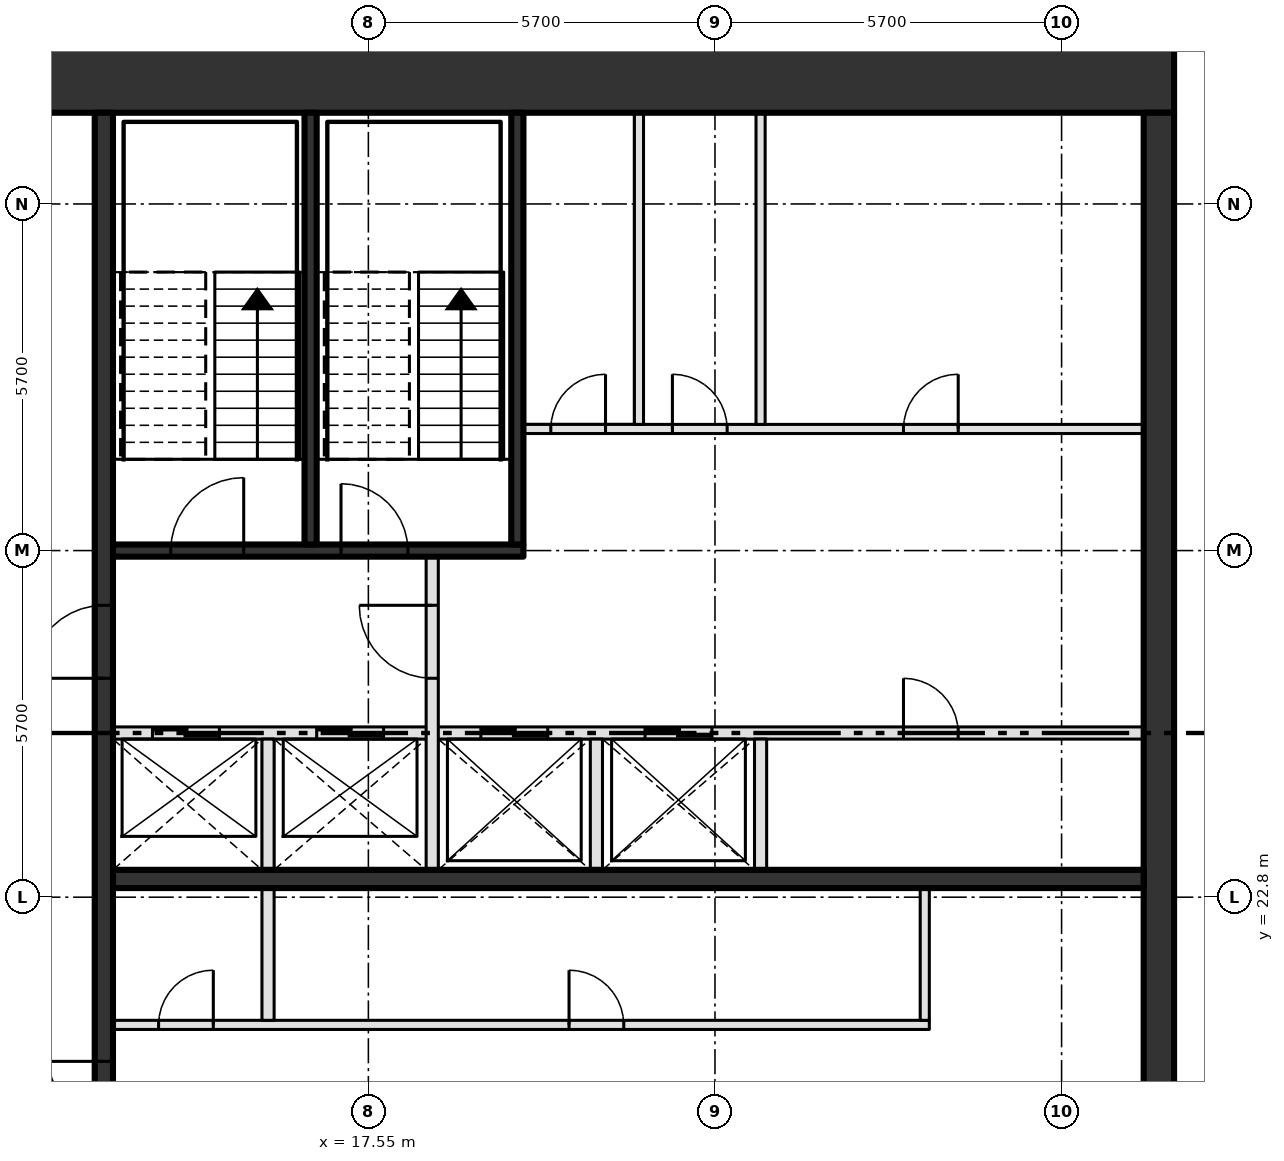
"""IFC4 building model, lengths in metres.
Left out: names, types, materials, properties, quantities, classifications, styles, units other than length and angle.
Written with IfcOpenShell. Run it as: python <this file> out.ifc"""

import sys

from ifc_helpers import new_model, si_unit, direction, frame, frame_2d, origin, place, context, subcontext, project, spatial, rectangle, extrude, element, fill, save


model = new_model("IFC4")
c1 = context("Model", 3, precision=1e-05, world=origin(), true_north=direction((0.0, 1.0)))
c2 = subcontext(c1, "Body", "Model", "MODEL_VIEW")
j1 = project(units=[si_unit("LENGTHUNIT", "METRE"), si_unit("PLANEANGLEUNIT", "RADIAN")], contexts=[c1])
p1 = place(None, origin())
s1 = spatial("IfcSite", under=j1, at=p1, CompositionType="ELEMENT")
p2 = place(p1, origin())
s2 = spatial("IfcBuilding", under=s1, at=p2, CompositionType="ELEMENT")
p3 = place(p2, frame((0.0, 0.0, 358.2)))
s3 = spatial("IfcBuildingStorey", under=s2, at=p3, CompositionType="ELEMENT", Elevation=358.2)
p4 = place(p3, frame((8.0, 36.3, -0.3), z_axis=(0.0, 0.0, 1.0), x_axis=(1.0, 0.0, 0.0)))
e1 = element("IfcWall", 1, at=p4, inside=s3, PredefinedType="SHEAR", context=c2, shape_type="SweptSolid", body=[
    extrude(rectangle(XDim=22.8, YDim=1.2, at=frame_2d((11.4, 0.0))), origin(), (0.0, 0.0, 1.0), 4.2),
])
p5 = place(p4, frame((2.3, 0.0, 0.3)))
e2 = element("IfcOpeningElement", 2, at=p5, cuts=e1, PredefinedType="OPENING", context=c2, shape_type="SweptSolid", body=[
    extrude(rectangle(XDim=1.8, YDim=2.1, at=frame_2d((0.9, 1.05))), frame((0.0, 0.61, 0.0), z_axis=(0.0, -1.0, 0.0), x_axis=(1.0, 0.0, 0.0)), (0.0, 0.0, 1.0), 1.22),
])
p6 = place(p3, frame((30.55, 14.6, -0.3), z_axis=(0.0, 0.0, 1.0), x_axis=(0.0, 1.0, 0.0)))
e3 = element("IfcWall", 3, at=p6, inside=s3, PredefinedType="SHEAR", context=c2, shape_type="SweptSolid", body=[
    extrude(rectangle(XDim=21.1, YDim=0.5, at=frame_2d((10.55, 0.0))), origin(), (0.0, 0.0, 1.0), 4.2),
])
p7 = place(p3, frame((13.35, 20.7, 0.0), z_axis=(0.0, 0.0, 1.0), x_axis=(1.0, 0.0, 0.0)))
e4 = element("IfcWall", 4, at=p7, inside=s3, PredefinedType="PARTITIONING", context=c2, shape_type="SweptSolid", body=[
    extrude(rectangle(XDim=13.425, YDim=0.15, at=frame_2d((6.712, 0.0))), origin(), (0.0, 0.0, 1.0), 3.9),
])
p8 = place(p7, frame((0.75, 0.0, 0.0)))
e5 = element("IfcOpeningElement", 5, at=p8, cuts=e4, PredefinedType="OPENING", context=c2, shape_type="SweptSolid", body=[
    extrude(rectangle(XDim=0.9, YDim=2.1, at=frame_2d((0.45, 1.05))), frame((0.0, 0.085, 0.0), z_axis=(0.0, -1.0, 0.0), x_axis=(1.0, 0.0, 0.0)), (0.0, 0.0, 1.0), 0.17),
])
p9 = place(p7, frame((7.5, 0.0, 0.0)))
e6 = element("IfcOpeningElement", 6, at=p9, cuts=e4, PredefinedType="OPENING", context=c2, shape_type="SweptSolid", body=[
    extrude(rectangle(XDim=0.9, YDim=2.1, at=frame_2d((0.45, 1.05))), frame((0.0, 0.085, 0.0), z_axis=(0.0, -1.0, 0.0), x_axis=(1.0, 0.0, 0.0)), (0.0, 0.0, 1.0), 0.17),
])
p10 = place(p3, frame((13.35, 23.1, 0.0), z_axis=(0.0, 0.0, 1.0), x_axis=(1.0, 0.0, 0.0)))
e7 = element("IfcWall", 7, at=p10, inside=s3, PredefinedType="SHEAR", context=c2, shape_type="SweptSolid", body=[
    extrude(rectangle(XDim=16.95, YDim=0.3, at=frame_2d((8.475, 0.0))), origin(), (0.0, 0.0, 1.0), 3.9),
])
p11 = place(p3, frame((13.35, 25.5, 0.0), z_axis=(0.0, 0.0, 1.0), x_axis=(1.0, 0.0, 0.0)))
e8 = element("IfcWall", 8, at=p11, inside=s3, PredefinedType="SOLIDWALL", context=c2, shape_type="SweptSolid", body=[
    extrude(rectangle(XDim=16.95, YDim=0.2, at=frame_2d((8.475, 0.0))), origin(), (0.0, 0.0, 1.0), 3.9),
])
p12 = place(p11, frame((0.65, 0.0, 0.0)))
e9 = element("IfcOpeningElement", 9, at=p12, cuts=e8, PredefinedType="OPENING", context=c2, shape_type="SweptSolid", body=[
    extrude(rectangle(XDim=1.1, YDim=2.1, at=frame_2d((0.55, 1.05))), frame((0.0, 0.11, 0.0), z_axis=(0.0, -1.0, 0.0), x_axis=(1.0, 0.0, 0.0)), (0.0, 0.0, 1.0), 0.22),
])
p13 = place(p11, frame((3.35, 0.0, 0.0)))
e10 = element("IfcOpeningElement", 10, at=p13, cuts=e8, PredefinedType="OPENING", context=c2, shape_type="SweptSolid", body=[
    extrude(rectangle(XDim=1.1, YDim=2.1, at=frame_2d((0.55, 1.05))), frame((0.0, 0.11, 0.0), z_axis=(0.0, -1.0, 0.0), x_axis=(1.0, 0.0, 0.0)), (0.0, 0.0, 1.0), 0.22),
])
p14 = place(p11, frame((6.05, 0.0, 0.0)))
e11 = element("IfcOpeningElement", 11, at=p14, cuts=e8, PredefinedType="OPENING", context=c2, shape_type="SweptSolid", body=[
    extrude(rectangle(XDim=1.1, YDim=2.1, at=frame_2d((0.55, 1.05))), frame((0.0, 0.11, 0.0), z_axis=(0.0, -1.0, 0.0), x_axis=(1.0, 0.0, 0.0)), (0.0, 0.0, 1.0), 0.22),
])
p15 = place(p11, frame((8.75, 0.0, 0.0)))
e12 = element("IfcOpeningElement", 12, at=p15, cuts=e8, PredefinedType="OPENING", context=c2, shape_type="SweptSolid", body=[
    extrude(rectangle(XDim=1.1, YDim=2.1, at=frame_2d((0.55, 1.05))), frame((0.0, 0.11, 0.0), z_axis=(0.0, -1.0, 0.0), x_axis=(1.0, 0.0, 0.0)), (0.0, 0.0, 1.0), 0.22),
])
p16 = place(p11, frame((13.0, 0.0, 0.0)))
e13 = element("IfcOpeningElement", 13, at=p16, cuts=e8, PredefinedType="OPENING", context=c2, shape_type="SweptSolid", body=[
    extrude(rectangle(XDim=0.9, YDim=2.1, at=frame_2d((0.45, 1.05))), frame((0.0, 0.11, 0.0), z_axis=(0.0, -1.0, 0.0), x_axis=(1.0, 0.0, 0.0)), (0.0, 0.0, 1.0), 0.22),
])
p17 = place(p3, frame((13.35, 28.5, 0.0), z_axis=(0.0, 0.0, 1.0), x_axis=(1.0, 0.0, 0.0)))
e14 = element("IfcWall", 14, at=p17, inside=s3, PredefinedType="SOLIDWALL", context=c2, shape_type="SweptSolid", body=[
    extrude(rectangle(XDim=6.75, YDim=0.2, at=frame_2d((3.375, 0.0))), origin(), (0.0, 0.0, 1.0), 3.9),
])
p18 = place(p17, frame((0.95, 0.0, 0.0)))
e15 = element("IfcOpeningElement", 15, at=p18, cuts=e14, PredefinedType="OPENING", context=c2, shape_type="SweptSolid", body=[
    extrude(rectangle(XDim=1.2, YDim=2.1, at=frame_2d((0.6, 1.05))), frame((0.0, 0.11, 0.0), z_axis=(0.0, -1.0, 0.0), x_axis=(1.0, 0.0, 0.0)), (0.0, 0.0, 1.0), 0.22),
])
p19 = place(p17, frame((3.75, 0.0, 0.0)))
e16 = element("IfcOpeningElement", 16, at=p19, cuts=e14, PredefinedType="OPENING", context=c2, shape_type="SweptSolid", body=[
    extrude(rectangle(XDim=1.1, YDim=2.1, at=frame_2d((0.55, 1.05))), frame((0.0, 0.11, 0.0), z_axis=(0.0, -1.0, 0.0), x_axis=(1.0, 0.0, 0.0)), (0.0, 0.0, 1.0), 0.22),
])
p20 = place(p3, frame((20.1, 30.5, 0.0), z_axis=(0.0, 0.0, 1.0), x_axis=(1.0, 0.0, 0.0)))
e17 = element("IfcWall", 17, at=p20, inside=s3, PredefinedType="PARTITIONING", context=c2, shape_type="SweptSolid", body=[
    extrude(rectangle(XDim=10.2, YDim=0.15, at=frame_2d((5.1, 0.0))), origin(), (0.0, 0.0, 1.0), 3.9),
])
p21 = place(p20, frame((0.45, 0.0, 0.0)))
e18 = element("IfcOpeningElement", 18, at=p21, cuts=e17, PredefinedType="OPENING", context=c2, shape_type="SweptSolid", body=[
    extrude(rectangle(XDim=0.9, YDim=2.1, at=frame_2d((0.45, 1.05))), frame((0.0, 0.085, 0.0), z_axis=(0.0, -1.0, 0.0), x_axis=(1.0, 0.0, 0.0)), (0.0, 0.0, 1.0), 0.17),
])
p22 = place(p20, frame((2.45, 0.0, 0.0)))
e19 = element("IfcOpeningElement", 19, at=p22, cuts=e17, PredefinedType="OPENING", context=c2, shape_type="SweptSolid", body=[
    extrude(rectangle(XDim=0.9, YDim=2.1, at=frame_2d((0.45, 1.05))), frame((0.0, 0.085, 0.0), z_axis=(0.0, -1.0, 0.0), x_axis=(1.0, 0.0, 0.0)), (0.0, 0.0, 1.0), 0.17),
])
p23 = place(p20, frame((6.25, 0.0, 0.0)))
e20 = element("IfcOpeningElement", 20, at=p23, cuts=e17, PredefinedType="OPENING", context=c2, shape_type="SweptSolid", body=[
    extrude(rectangle(XDim=0.9, YDim=2.1, at=frame_2d((0.45, 1.05))), frame((0.0, 0.085, 0.0), z_axis=(0.0, -1.0, 0.0), x_axis=(1.0, 0.0, 0.0)), (0.0, 0.0, 1.0), 0.17),
])
p24 = place(p3, frame((13.2, 14.6, 0.0), z_axis=(0.0, 0.0, 1.0), x_axis=(0.0, 1.0, 0.0)))
e21 = element("IfcWall", 21, at=p24, inside=s3, PredefinedType="SHEAR", context=c2, shape_type="SweptSolid", body=[
    extrude(rectangle(XDim=21.1, YDim=0.3, at=frame_2d((10.55, 0.0))), origin(), (0.0, 0.0, 1.0), 3.9),
])
p25 = place(p24, frame((3.7, 0.0, 0.0)))
e22 = element("IfcOpeningElement", 22, at=p25, cuts=e21, PredefinedType="OPENING", context=c2, shape_type="SweptSolid", body=[
    extrude(rectangle(XDim=1.8, YDim=2.1, at=frame_2d((0.9, 1.05))), frame((0.0, 0.16, 0.0), z_axis=(0.0, -1.0, 0.0), x_axis=(1.0, 0.0, 0.0)), (0.0, 0.0, 1.0), 0.32),
])
p26 = place(p24, frame((11.8, 0.0, 0.0)))
e23 = element("IfcOpeningElement", 23, at=p26, cuts=e21, PredefinedType="OPENING", context=c2, shape_type="SweptSolid", body=[
    extrude(rectangle(XDim=1.2, YDim=2.1, at=frame_2d((0.6, 1.05))), frame((0.0, 0.16, 0.0), z_axis=(0.0, -1.0, 0.0), x_axis=(1.0, 0.0, 0.0)), (0.0, 0.0, 1.0), 0.32),
])
p27 = place(p3, frame((15.9, 20.775, 0.0), z_axis=(0.0, 0.0, 1.0), x_axis=(0.0, 1.0, 0.0)))
e24 = element("IfcWall", 24, at=p27, inside=s3, PredefinedType="SOLIDWALL", context=c2, shape_type="SweptSolid", body=[
    extrude(rectangle(XDim=4.625, YDim=0.2, at=frame_2d((2.312, 0.0))), origin(), (0.0, 0.0, 1.0), 3.9),
])
p28 = place(p3, frame((16.6, 28.6, 0.0), z_axis=(0.0, 0.0, 1.0), x_axis=(0.0, 1.0, 0.0)))
e25 = element("IfcWall", 25, at=p28, inside=s3, PredefinedType="SOLIDWALL", context=c2, shape_type="SweptSolid", body=[
    extrude(rectangle(XDim=7.1, YDim=0.2, at=frame_2d((3.55, 0.0))), origin(), (0.0, 0.0, 1.0), 3.9),
])
p29 = place(p3, frame((18.6, 23.25, 0.0), z_axis=(0.0, 0.0, 1.0), x_axis=(0.0, 1.0, 0.0)))
e26 = element("IfcWall", 26, at=p29, inside=s3, PredefinedType="SOLIDWALL", context=c2, shape_type="SweptSolid", body=[
    extrude(rectangle(XDim=5.15, YDim=0.2, at=frame_2d((2.575, 0.0))), origin(), (0.0, 0.0, 1.0), 3.9),
])
p30 = place(p29, frame((3.15, 0.0, 0.0)))
e27 = element("IfcOpeningElement", 27, at=p30, cuts=e26, PredefinedType="OPENING", context=c2, shape_type="SweptSolid", body=[
    extrude(rectangle(XDim=1.2, YDim=2.1, at=frame_2d((0.6, 1.05))), frame((0.0, 0.11, 0.0), z_axis=(0.0, -1.0, 0.0), x_axis=(1.0, 0.0, 0.0)), (0.0, 0.0, 1.0), 0.22),
])
p31 = place(p3, frame((20.0, 28.6, 0.0), z_axis=(0.0, 0.0, 1.0), x_axis=(0.0, 1.0, 0.0)))
e28 = element("IfcWall", 28, at=p31, inside=s3, PredefinedType="SOLIDWALL", context=c2, shape_type="SweptSolid", body=[
    extrude(rectangle(XDim=7.1, YDim=0.2, at=frame_2d((3.55, 0.0))), origin(), (0.0, 0.0, 1.0), 3.9),
])
p32 = place(p3, frame((21.3, 23.25, 0.0), z_axis=(0.0, 0.0, 1.0), x_axis=(0.0, 1.0, 0.0)))
e29 = element("IfcWall", 29, at=p32, inside=s3, PredefinedType="SOLIDWALL", context=c2, shape_type="SweptSolid", body=[
    extrude(rectangle(XDim=2.15, YDim=0.2, at=frame_2d((1.075, 0.0))), origin(), (0.0, 0.0, 1.0), 3.9),
])
p33 = place(p3, frame((22.0, 30.575, 0.0), z_axis=(0.0, 0.0, 1.0), x_axis=(0.0, 1.0, 0.0)))
e30 = element("IfcWall", 30, at=p33, inside=s3, PredefinedType="PARTITIONING", context=c2, shape_type="SweptSolid", body=[
    extrude(rectangle(XDim=5.125, YDim=0.15, at=frame_2d((2.562, 0.0))), origin(), (0.0, 0.0, 1.0), 3.9),
])
p34 = place(p3, frame((24.0, 23.25, 0.0), z_axis=(0.0, 0.0, 1.0), x_axis=(0.0, 1.0, 0.0)))
e31 = element("IfcWall", 31, at=p34, inside=s3, PredefinedType="SOLIDWALL", context=c2, shape_type="SweptSolid", body=[
    extrude(rectangle(XDim=2.15, YDim=0.2, at=frame_2d((1.075, 0.0))), origin(), (0.0, 0.0, 1.0), 3.9),
])
p35 = place(p3, frame((24.0, 30.575, 0.0), z_axis=(0.0, 0.0, 1.0), x_axis=(0.0, 1.0, 0.0)))
e32 = element("IfcWall", 32, at=p35, inside=s3, PredefinedType="PARTITIONING", context=c2, shape_type="SweptSolid", body=[
    extrude(rectangle(XDim=5.125, YDim=0.15, at=frame_2d((2.562, 0.0))), origin(), (0.0, 0.0, 1.0), 3.9),
])
p36 = place(p3, frame((26.7, 20.775, 0.0), z_axis=(0.0, 0.0, 1.0), x_axis=(0.0, 1.0, 0.0)))
e33 = element("IfcWall", 33, at=p36, inside=s3, PredefinedType="PARTITIONING", context=c2, shape_type="SweptSolid", body=[
    extrude(rectangle(XDim=2.175, YDim=0.15, at=frame_2d((1.087, 0.0))), origin(), (0.0, 0.0, 1.0), 3.9),
])
p37 = place(p12, origin())
e34 = element("IfcDoor", 34, at=p37, inside=s3, OperationType="SLIDING_TO_LEFT", PredefinedType="DOOR", context=c2, shape_type="SweptSolid", body=[
    extrude(rectangle(XDim=1.1, YDim=2.1, at=frame_2d((0.55, 1.05))), frame((0.0, 0.025, 0.0), z_axis=(0.0, -1.0, 0.0), x_axis=(1.0, 0.0, 0.0)), (0.0, 0.0, 1.0), 0.05),
])
fill(e9, e34)
p38 = place(p13, origin())
e35 = element("IfcDoor", 35, at=p38, inside=s3, OperationType="SLIDING_TO_LEFT", PredefinedType="DOOR", context=c2, shape_type="SweptSolid", body=[
    extrude(rectangle(XDim=1.1, YDim=2.1, at=frame_2d((0.55, 1.05))), frame((0.0, 0.025, 0.0), z_axis=(0.0, -1.0, 0.0), x_axis=(1.0, 0.0, 0.0)), (0.0, 0.0, 1.0), 0.05),
])
fill(e10, e35)
p39 = place(p14, origin())
e36 = element("IfcDoor", 36, at=p39, inside=s3, OperationType="SLIDING_TO_LEFT", PredefinedType="DOOR", context=c2, shape_type="SweptSolid", body=[
    extrude(rectangle(XDim=1.1, YDim=2.1, at=frame_2d((0.55, 1.05))), frame((0.0, 0.025, 0.0), z_axis=(0.0, -1.0, 0.0), x_axis=(1.0, 0.0, 0.0)), (0.0, 0.0, 1.0), 0.05),
])
fill(e11, e36)
p40 = place(p15, origin())
e37 = element("IfcDoor", 37, at=p40, inside=s3, OperationType="SLIDING_TO_LEFT", PredefinedType="DOOR", context=c2, shape_type="SweptSolid", body=[
    extrude(rectangle(XDim=1.1, YDim=2.1, at=frame_2d((0.55, 1.05))), frame((0.0, 0.025, 0.0), z_axis=(0.0, -1.0, 0.0), x_axis=(1.0, 0.0, 0.0)), (0.0, 0.0, 1.0), 0.05),
])
fill(e12, e37)
p41 = place(p8, origin())
e38 = element("IfcDoor", 38, at=p41, inside=s3, OperationType="SINGLE_SWING_RIGHT", PredefinedType="DOOR", context=c2, shape_type="SweptSolid", body=[
    extrude(rectangle(XDim=0.9, YDim=2.1, at=frame_2d((0.45, 1.05))), frame((0.0, 0.025, 0.0), z_axis=(0.0, -1.0, 0.0), x_axis=(1.0, 0.0, 0.0)), (0.0, 0.0, 1.0), 0.05),
])
fill(e5, e38)
p42 = place(p9, origin())
e39 = element("IfcDoor", 39, at=p42, inside=s3, OperationType="SINGLE_SWING_LEFT", PredefinedType="DOOR", context=c2, shape_type="SweptSolid", body=[
    extrude(rectangle(XDim=0.9, YDim=2.1, at=frame_2d((0.45, 1.05))), frame((0.0, 0.025, 0.0), z_axis=(0.0, -1.0, 0.0), x_axis=(1.0, 0.0, 0.0)), (0.0, 0.0, 1.0), 0.05),
])
fill(e6, e39)
p43 = place(p16, origin())
e40 = element("IfcDoor", 40, at=p43, inside=s3, OperationType="SINGLE_SWING_LEFT", PredefinedType="DOOR", context=c2, shape_type="SweptSolid", body=[
    extrude(rectangle(XDim=0.9, YDim=2.1, at=frame_2d((0.45, 1.05))), frame((0.0, 0.025, 0.0), z_axis=(0.0, -1.0, 0.0), x_axis=(1.0, 0.0, 0.0)), (0.0, 0.0, 1.0), 0.05),
])
fill(e13, e40)
p44 = place(p21, origin())
e41 = element("IfcDoor", 41, at=p44, inside=s3, OperationType="SINGLE_SWING_RIGHT", PredefinedType="DOOR", context=c2, shape_type="SweptSolid", body=[
    extrude(rectangle(XDim=0.9, YDim=2.1, at=frame_2d((0.45, 1.05))), frame((0.0, 0.025, 0.0), z_axis=(0.0, -1.0, 0.0), x_axis=(1.0, 0.0, 0.0)), (0.0, 0.0, 1.0), 0.05),
])
fill(e18, e41)
p45 = place(p22, origin())
e42 = element("IfcDoor", 42, at=p45, inside=s3, OperationType="SINGLE_SWING_LEFT", PredefinedType="DOOR", context=c2, shape_type="SweptSolid", body=[
    extrude(rectangle(XDim=0.9, YDim=2.1, at=frame_2d((0.45, 1.05))), frame((0.0, 0.025, 0.0), z_axis=(0.0, -1.0, 0.0), x_axis=(1.0, 0.0, 0.0)), (0.0, 0.0, 1.0), 0.05),
])
fill(e19, e42)
p46 = place(p23, origin())
e43 = element("IfcDoor", 43, at=p46, inside=s3, OperationType="SINGLE_SWING_RIGHT", PredefinedType="DOOR", context=c2, shape_type="SweptSolid", body=[
    extrude(rectangle(XDim=0.9, YDim=2.1, at=frame_2d((0.45, 1.05))), frame((0.0, 0.025, 0.0), z_axis=(0.0, -1.0, 0.0), x_axis=(1.0, 0.0, 0.0)), (0.0, 0.0, 1.0), 0.05),
])
fill(e20, e43)
p47 = place(p18, origin())
e44 = element("IfcDoor", 44, at=p47, inside=s3, OperationType="SINGLE_SWING_RIGHT", PredefinedType="DOOR", context=c2, shape_type="SweptSolid", body=[
    extrude(rectangle(XDim=1.2, YDim=2.1, at=frame_2d((0.6, 1.05))), frame((0.0, 0.025, 0.0), z_axis=(0.0, -1.0, 0.0), x_axis=(1.0, 0.0, 0.0)), (0.0, 0.0, 1.0), 0.05),
])
fill(e15, e44)
p48 = place(p19, origin())
e45 = element("IfcDoor", 45, at=p48, inside=s3, OperationType="SINGLE_SWING_LEFT", PredefinedType="DOOR", context=c2, shape_type="SweptSolid", body=[
    extrude(rectangle(XDim=1.1, YDim=2.1, at=frame_2d((0.55, 1.05))), frame((0.0, 0.025, 0.0), z_axis=(0.0, -1.0, 0.0), x_axis=(1.0, 0.0, 0.0)), (0.0, 0.0, 1.0), 0.05),
])
fill(e16, e45)
p49 = place(p25, origin())
e46 = element("IfcDoor", 46, at=p49, inside=s3, OperationType="DOUBLE_DOOR_SINGLE_SWING", PredefinedType="DOOR", context=c2, shape_type="SweptSolid", body=[
    extrude(rectangle(XDim=1.8, YDim=2.1, at=frame_2d((0.9, 1.05))), frame((0.0, 0.025, 0.0), z_axis=(0.0, -1.0, 0.0), x_axis=(1.0, 0.0, 0.0)), (0.0, 0.0, 1.0), 0.05),
])
fill(e22, e46)
p50 = place(p26, origin())
e47 = element("IfcDoor", 47, at=p50, inside=s3, OperationType="SINGLE_SWING_LEFT", PredefinedType="DOOR", context=c2, shape_type="SweptSolid", body=[
    extrude(rectangle(XDim=1.2, YDim=2.1, at=frame_2d((0.6, 1.05))), frame((0.0, 0.025, 0.0), z_axis=(0.0, -1.0, 0.0), x_axis=(1.0, 0.0, 0.0)), (0.0, 0.0, 1.0), 0.05),
])
fill(e23, e47)
p51 = place(p30, origin())
e48 = element("IfcDoor", 48, at=p51, inside=s3, OperationType="SINGLE_SWING_RIGHT", PredefinedType="DOOR", context=c2, shape_type="SweptSolid", body=[
    extrude(rectangle(XDim=1.2, YDim=2.1, at=frame_2d((0.6, 1.05))), frame((0.0, 0.025, 0.0), z_axis=(0.0, -1.0, 0.0), x_axis=(1.0, 0.0, 0.0)), (0.0, 0.0, 1.0), 0.05),
])
fill(e27, e48)
save(model, sys.argv[1])
